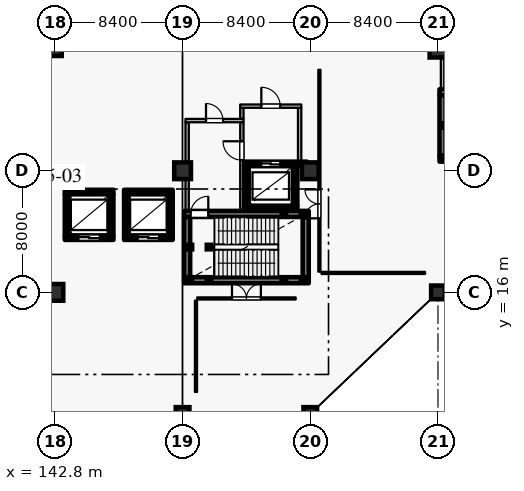
"""IFC4 building model, lengths in metres.
Left out: names, types, materials, properties, quantities, classifications, styles, units other than length and angle.
Written with IfcOpenShell. Run it as: python <this file> out.ifc"""

import sys

from ifc_helpers import new_model, si_unit, direction, frame, frame_2d, origin, origin_2d, place, context, subcontext, project, spatial, rectangle, hollow_rectangle, circle, extrude, element, fill, save


model = new_model("IFC4")
c1 = context("Model", 3, precision=1e-05, world=origin(), true_north=direction((0.0, 1.0)))
c2 = subcontext(c1, "Body", "Model", "MODEL_VIEW")
j1 = project(units=[si_unit("LENGTHUNIT", "METRE"), si_unit("PLANEANGLEUNIT", "RADIAN")], contexts=[c1])
p1 = place(None, origin())
s1 = spatial("IfcSite", under=j1, at=p1, CompositionType="ELEMENT")
p2 = place(p1, origin())
s2 = spatial("IfcBuilding", under=s1, at=p2, CompositionType="ELEMENT")
p3 = place(p2, frame((0.0, 0.0, 6.0)))
s3 = spatial("IfcBuildingStorey", under=s2, at=p3, CompositionType="ELEMENT", Elevation=6.0)
p4 = place(p3, frame((142.8, 16.0, 0.0), z_axis=(0.0, 0.0, 1.0), x_axis=(1.0, 0.0, 0.0)))
e1 = element("IfcColumn", 1, at=p4, inside=s3, PredefinedType="COLUMN", context=c2, shape_type="SweptSolid", body=[
    extrude(circle(Radius=0.55, at=origin_2d()), origin(), (0.0, 0.0, 1.0), 5.4),
])
for number, where, z_axis, x_axis in (
    (2, (142.8, 32.0, 0.0), (0.0, 0.0, 1.0), (1.0, 0.0, 0.0)),
    (3, (151.2, 8.0, 0.0), (0.0, 0.0, 1.0), (1.0, 0.0, 0.0)),
):
    element("IfcColumn", number, at=place(p3, frame(where, z_axis=z_axis, x_axis=x_axis)), inside=s3, PredefinedType="COLUMN", context=c2, shape_type="SweptSolid", body=[
        extrude(circle(Radius=0.45, at=origin_2d()), origin(), (0.0, 0.0, 1.0), 5.4),
    ])
p5 = place(p3, frame((151.2, 24.0, 0.0), z_axis=(0.0, 0.0, 1.0), x_axis=(1.0, 0.0, 0.0)))
e4 = element("IfcColumn", 4, at=p5, inside=s3, PredefinedType="COLUMN", context=c2, shape_type="SweptSolid", body=[
    extrude(circle(Radius=0.55, at=origin_2d()), origin(), (0.0, 0.0, 1.0), 5.4),
])
p6 = place(p3, frame((159.6, 8.0, 0.0), z_axis=(0.0, 0.0, 1.0), x_axis=(1.0, 0.0, 0.0)))
e5 = element("IfcColumn", 5, at=p6, inside=s3, PredefinedType="COLUMN", context=c2, shape_type="SweptSolid", body=[
    extrude(circle(Radius=0.45, at=origin_2d()), origin(), (0.0, 0.0, 1.0), 5.4),
])
p7 = place(p3, frame((159.6, 24.0, 0.0), z_axis=(0.0, 0.0, 1.0), x_axis=(1.0, 0.0, 0.0)))
e6 = element("IfcColumn", 6, at=p7, inside=s3, PredefinedType="COLUMN", context=c2, shape_type="SweptSolid", body=[
    extrude(circle(Radius=0.55, at=origin_2d()), origin(), (0.0, 0.0, 1.0), 5.4),
])
p8 = place(p3, frame((168.0, 16.0, 0.0), z_axis=(0.0, 0.0, 1.0), x_axis=(1.0, 0.0, 0.0)))
e7 = element("IfcColumn", 7, at=p8, inside=s3, PredefinedType="COLUMN", context=c2, shape_type="SweptSolid", body=[
    extrude(circle(Radius=0.45, at=origin_2d()), origin(), (0.0, 0.0, 1.0), 5.4),
])
p9 = place(p3, frame((168.0, 32.0, 0.0), z_axis=(0.0, 0.0, 1.0), x_axis=(1.0, 0.0, 0.0)))
e8 = element("IfcColumn", 8, at=p9, inside=s3, PredefinedType="COLUMN", context=c2, shape_type="SweptSolid", body=[
    extrude(circle(Radius=0.55, at=origin_2d()), origin(), (0.0, 0.0, 1.0), 5.4),
])
p10 = place(p3, frame((155.25, 21.55, 0.0), z_axis=(0.0, 0.0, 1.0), x_axis=(1.0, 0.0, 0.0)))
e9 = element("IfcWall", 9, at=p10, inside=s3, PredefinedType="SHEAR", context=c2, shape_type="SweptSolid", body=[
    extrude(rectangle(XDim=3.5, YDim=0.3, at=frame_2d((1.75, 0.0))), origin(), (0.0, 0.0, 1.0), 5.045),
])
p11 = place(p3, frame((158.6, 21.705, 0.0), z_axis=(0.0, 0.0, 1.0), x_axis=(0.0, 1.0, 0.0)))
e10 = element("IfcWall", 10, at=p11, inside=s3, PredefinedType="SHEAR", context=c2, shape_type="SweptSolid", body=[
    extrude(rectangle(XDim=2.59, YDim=0.3, at=frame_2d((1.295, 0.0))), origin(), (0.0, 0.0, 1.0), 5.045),
])
p12 = place(p3, frame((159.38, 24.45, 0.0), z_axis=(0.0, 0.0, 1.0), x_axis=(-1.0, 0.0, 0.0)))
e11 = element("IfcWall", 11, at=p12, inside=s3, PredefinedType="SHEAR", context=c2, shape_type="SweptSolid", body=[
    extrude(rectangle(XDim=4.13, YDim=0.3, at=frame_2d((2.065, 0.0))), origin(), (0.0, 0.0, 1.0), 5.045),
])
p13 = place(p12, frame((1.755, 0.0, 0.0)))
e12 = element("IfcOpeningElement", 12, at=p13, cuts=e11, PredefinedType="OPENING", context=c2, shape_type="SweptSolid", body=[
    extrude(rectangle(XDim=1.25, YDim=2.25, at=frame_2d((0.625, 1.125))), frame((0.0, 0.16, 0.0), z_axis=(0.0, -1.0, 0.0), x_axis=(1.0, 0.0, 0.0)), (0.0, 0.0, 1.0), 0.32),
])
p14 = place(p3, frame((155.4, 24.295, 0.0), z_axis=(0.0, 0.0, 1.0), x_axis=(0.0, -1.0, 0.0)))
e13 = element("IfcWall", 13, at=p14, inside=s3, PredefinedType="SHEAR", context=c2, shape_type="SweptSolid", body=[
    extrude(rectangle(XDim=2.59, YDim=0.3, at=frame_2d((1.295, 0.0))), origin(), (0.0, 0.0, 1.0), 5.045),
])
p15 = place(p3, frame((143.45, 19.6, 0.0), z_axis=(0.0, 0.0, 1.0), x_axis=(1.0, 0.0, 0.0)))
e14 = element("IfcWall", 14, at=p15, inside=s3, PredefinedType="SHEAR", context=c2, shape_type="SweptSolid", body=[
    extrude(rectangle(XDim=3.2, YDim=0.3, at=frame_2d((1.6, 0.0))), origin(), (0.0, 0.0, 1.0), 5.045),
])
p16 = place(p15, frame((0.9, 0.0, 0.0)))
e15 = element("IfcOpeningElement", 15, at=p16, cuts=e14, PredefinedType="OPENING", context=c2, shape_type="SweptSolid", body=[
    extrude(rectangle(XDim=1.4, YDim=2.35, at=frame_2d((0.7, 1.175))), frame((0.0, 0.16, 0.0), z_axis=(0.0, -1.0, 0.0), x_axis=(1.0, 0.0, 0.0)), (0.0, 0.0, 1.0), 0.32),
])
p17 = place(p3, frame((146.5, 19.755, 0.0), z_axis=(0.0, 0.0, 1.0), x_axis=(0.0, 1.0, 0.0)))
e16 = element("IfcWall", 16, at=p17, inside=s3, PredefinedType="SHEAR", context=c2, shape_type="SweptSolid", body=[
    extrude(rectangle(XDim=2.69, YDim=0.3, at=frame_2d((1.345, 0.0))), origin(), (0.0, 0.0, 1.0), 5.045),
])
p18 = place(p3, frame((146.65, 22.6, 0.0), z_axis=(0.0, 0.0, 1.0), x_axis=(-1.0, 0.0, 0.0)))
e17 = element("IfcWall", 17, at=p18, inside=s3, PredefinedType="SHEAR", context=c2, shape_type="SweptSolid", body=[
    extrude(rectangle(XDim=3.2, YDim=0.3, at=frame_2d((1.6, 0.0))), origin(), (0.0, 0.0, 1.0), 5.045),
])
p19 = place(p3, frame((143.6, 22.445, 0.0), z_axis=(0.0, 0.0, 1.0), x_axis=(0.0, -1.0, 0.0)))
e18 = element("IfcWall", 18, at=p19, inside=s3, PredefinedType="SHEAR", context=c2, shape_type="SweptSolid", body=[
    extrude(rectangle(XDim=2.69, YDim=0.3, at=frame_2d((1.345, 0.0))), origin(), (0.0, 0.0, 1.0), 5.045),
])
p20 = place(p3, frame((147.35, 19.6, 0.0), z_axis=(0.0, 0.0, 1.0), x_axis=(1.0, 0.0, 0.0)))
e19 = element("IfcWall", 19, at=p20, inside=s3, PredefinedType="SHEAR", context=c2, shape_type="SweptSolid", body=[
    extrude(rectangle(XDim=3.2, YDim=0.3, at=frame_2d((1.6, 0.0))), origin(), (0.0, 0.0, 1.0), 5.045),
])
p21 = place(p20, frame((0.9, 0.0, 0.0)))
e20 = element("IfcOpeningElement", 20, at=p21, cuts=e19, PredefinedType="OPENING", context=c2, shape_type="SweptSolid", body=[
    extrude(rectangle(XDim=1.4, YDim=2.35, at=frame_2d((0.7, 1.175))), frame((0.0, 0.16, 0.0), z_axis=(0.0, -1.0, 0.0), x_axis=(1.0, 0.0, 0.0)), (0.0, 0.0, 1.0), 0.32),
])
p22 = place(p3, frame((150.4, 19.755, 0.0), z_axis=(0.0, 0.0, 1.0), x_axis=(0.0, 1.0, 0.0)))
e21 = element("IfcWall", 21, at=p22, inside=s3, PredefinedType="SHEAR", context=c2, shape_type="SweptSolid", body=[
    extrude(rectangle(XDim=2.69, YDim=0.3, at=frame_2d((1.345, 0.0))), origin(), (0.0, 0.0, 1.0), 5.045),
])
p23 = place(p3, frame((150.55, 22.6, 0.0), z_axis=(0.0, 0.0, 1.0), x_axis=(-1.0, 0.0, 0.0)))
e22 = element("IfcWall", 22, at=p23, inside=s3, PredefinedType="SHEAR", context=c2, shape_type="SweptSolid", body=[
    extrude(rectangle(XDim=3.2, YDim=0.3, at=frame_2d((1.6, 0.0))), origin(), (0.0, 0.0, 1.0), 5.045),
])
p24 = place(p3, frame((147.5, 22.445, 0.0), z_axis=(0.0, 0.0, 1.0), x_axis=(0.0, -1.0, 0.0)))
e23 = element("IfcWall", 23, at=p24, inside=s3, PredefinedType="SHEAR", context=c2, shape_type="SweptSolid", body=[
    extrude(rectangle(XDim=2.69, YDim=0.3, at=frame_2d((1.345, 0.0))), origin(), (0.0, 0.0, 1.0), 5.045),
])
p25 = place(p3, frame((151.3, 16.8, 0.0), z_axis=(0.0, 0.0, 1.0), x_axis=(1.0, 0.0, 0.0)))
e24 = element("IfcWall", 24, at=p25, inside=s3, PredefinedType="SHEAR", context=c2, shape_type="SweptSolid", body=[
    extrude(rectangle(XDim=8.2, YDim=0.4, at=frame_2d((4.1, 0.0))), origin(), (0.0, 0.0, 1.0), 5.045),
])
p26 = place(p3, frame((159.3, 17.005, 0.0), z_axis=(0.0, 0.0, 1.0), x_axis=(0.0, 1.0, 0.0)))
e25 = element("IfcWall", 25, at=p26, inside=s3, PredefinedType="SHEAR", context=c2, shape_type="SweptSolid", body=[
    extrude(rectangle(XDim=3.95, YDim=0.4, at=frame_2d((1.975, 0.0))), origin(), (0.0, 0.0, 1.0), 5.045),
])
p27 = place(p3, frame((151.3, 21.16, 0.0), z_axis=(0.0, 0.0, 1.0), x_axis=(1.0, 0.0, 0.0)))
e26 = element("IfcWall", 26, at=p27, inside=s3, PredefinedType="SHEAR", context=c2, shape_type="SweptSolid", body=[
    extrude(rectangle(XDim=8.2, YDim=0.4, at=frame_2d((4.1, 0.0))), origin(), (0.0, 0.0, 1.0), 5.045),
])
p28 = place(p27, frame((0.43, 0.0, 0.0)))
e27 = element("IfcOpeningElement", 27, at=p28, cuts=e26, PredefinedType="OPENING", context=c2, shape_type="SweptSolid", body=[
    extrude(rectangle(XDim=1.16, YDim=2.2, at=frame_2d((0.58, 1.1))), frame((0.0, 0.21, 0.0), z_axis=(0.0, -1.0, 0.0), x_axis=(1.0, 0.0, 0.0)), (0.0, 0.0, 1.0), 0.42),
])
p29 = place(p3, frame((151.5, 17.005, 0.0), z_axis=(0.0, 0.0, 1.0), x_axis=(0.0, 1.0, 0.0)))
e28 = element("IfcWall", 28, at=p29, inside=s3, PredefinedType="SHEAR", context=c2, shape_type="SweptSolid", body=[
    extrude(rectangle(XDim=3.95, YDim=0.4, at=frame_2d((1.975, 0.0))), origin(), (0.0, 0.0, 1.0), 5.045),
])
p30 = place(p3, frame((151.5, 21.365, 0.0), z_axis=(0.0, 0.0, 1.0), x_axis=(0.0, 1.0, 0.0)))
e29 = element("IfcWall", 29, at=p30, inside=s3, PredefinedType="PARTITIONING", context=c2, shape_type="SweptSolid", body=[
    extrude(rectangle(XDim=5.82, YDim=0.22, at=frame_2d((2.91, 0.0))), origin(), (0.0, 0.0, 1.0), 3.45),
])
p31 = place(p3, frame((151.39, 27.3, 0.0), z_axis=(0.0, 0.0, 1.0), x_axis=(1.0, 0.0, 0.0)))
e30 = element("IfcWall", 30, at=p31, inside=s3, PredefinedType="PARTITIONING", context=c2, shape_type="SweptSolid", body=[
    extrude(rectangle(XDim=3.82, YDim=0.22, at=frame_2d((1.91, 0.0))), origin(), (0.0, 0.0, 1.0), 5.045),
])
p32 = place(p31, frame((1.35, 0.0, 0.0)))
e31 = element("IfcOpeningElement", 31, at=p32, cuts=e30, PredefinedType="OPENING", context=c2, shape_type="SweptSolid", body=[
    extrude(rectangle(XDim=1.12, YDim=2.2, at=frame_2d((0.56, 1.1))), frame((0.0, 0.12, 0.0), z_axis=(0.0, -1.0, 0.0), x_axis=(1.0, 0.0, 0.0)), (0.0, 0.0, 1.0), 0.24),
])
p33 = place(p3, frame((155.1, 21.365, 0.0), z_axis=(0.0, 0.0, 1.0), x_axis=(0.0, 1.0, 0.0)))
e32 = element("IfcWall", 32, at=p33, inside=s3, PredefinedType="PARTITIONING", context=c2, shape_type="SweptSolid", body=[
    extrude(rectangle(XDim=5.82, YDim=0.22, at=frame_2d((2.91, 0.0))), origin(), (0.0, 0.0, 1.0), 5.045),
])
p34 = place(p33, frame((3.335, 0.0, 0.0)))
e33 = element("IfcOpeningElement", 33, at=p34, cuts=e32, PredefinedType="OPENING", context=c2, shape_type="SweptSolid", body=[
    extrude(rectangle(XDim=1.24, YDim=2.2, at=frame_2d((0.62, 1.1))), frame((0.0, 0.12, 0.0), z_axis=(0.0, -1.0, 0.0), x_axis=(1.0, 0.0, 0.0)), (0.0, 0.0, 1.0), 0.24),
])
p35 = place(p3, frame((155.1, 27.415, 0.0), z_axis=(0.0, 0.0, 1.0), x_axis=(0.0, 1.0, 0.0)))
e34 = element("IfcWall", 34, at=p35, inside=s3, PredefinedType="PARTITIONING", context=c2, shape_type="SweptSolid", body=[
    extrude(rectangle(XDim=0.72, YDim=0.22, at=frame_2d((0.36, 0.0))), origin(), (0.0, 0.0, 1.0), 5.045),
])
p36 = place(p3, frame((158.9, 24.605, 0.0), z_axis=(0.0, 0.0, 1.0), x_axis=(0.0, 1.0, 0.0)))
e35 = element("IfcWall", 35, at=p36, inside=s3, PredefinedType="PARTITIONING", context=c2, shape_type="SweptSolid", body=[
    extrude(rectangle(XDim=3.53, YDim=0.22, at=frame_2d((1.765, 0.0))), origin(), (0.0, 0.0, 1.0), 5.045),
])
p37 = place(p3, frame((154.99, 28.25, 0.0), z_axis=(0.0, 0.0, 1.0), x_axis=(1.0, 0.0, 0.0)))
e36 = element("IfcWall", 36, at=p37, inside=s3, PredefinedType="PARTITIONING", context=c2, shape_type="SweptSolid", body=[
    extrude(rectangle(XDim=4.02, YDim=0.22, at=frame_2d((2.01, 0.0))), origin(), (0.0, 0.0, 1.0), 5.045),
])
p38 = place(p37, frame((1.39, 0.0, 0.0)))
e37 = element("IfcOpeningElement", 37, at=p38, cuts=e36, PredefinedType="OPENING", context=c2, shape_type="SweptSolid", body=[
    extrude(rectangle(XDim=1.24, YDim=2.2, at=frame_2d((0.62, 1.1))), frame((0.0, 0.12, 0.0), z_axis=(0.0, -1.0, 0.0), x_axis=(1.0, 0.0, 0.0)), (0.0, 0.0, 1.0), 0.24),
])
for number, where, z_axis, x_axis in (
    (38, (151.68, 16.8, 0.0), (0.0, 0.0, 1.0), (1.0, 0.0, 0.0)),
    (39, (151.68, 18.98, 0.0), (0.0, 0.0, 1.0), (1.0, 0.0, 0.0)),
    (40, (152.94, 16.8, 0.0), (0.0, 0.0, 1.0), (1.0, 0.0, 0.0)),
    (41, (152.94, 18.98, 0.0), (0.0, 0.0, 1.0), (1.0, 0.0, 0.0)),
):
    element("IfcColumn", number, at=place(p3, frame(where, z_axis=z_axis, x_axis=x_axis)), inside=s3, PredefinedType="COLUMN", context=c2, shape_type="SweptSolid", body=[
        extrude(hollow_rectangle(XDim=0.3, YDim=0.3, WallThickness=0.012, at=origin_2d()), origin(), (0.0, 0.0, 1.0), 5.22),
    ])
for number, where, z_axis, x_axis in (
    (42, (157.86, 16.8, -3.0), (0.0, 0.0, 1.0), (1.0, 0.0, 0.0)),
    (43, (157.86, 21.16, -3.0), (0.0, 0.0, 1.0), (1.0, 0.0, 0.0)),
    (44, (159.12, 16.8, -3.0), (0.0, 0.0, 1.0), (1.0, 0.0, 0.0)),
    (45, (159.12, 21.16, -3.0), (0.0, 0.0, 1.0), (1.0, 0.0, 0.0)),
):
    element("IfcColumn", number, at=place(p3, frame(where, z_axis=z_axis, x_axis=x_axis)), inside=s3, PredefinedType="COLUMN", context=c2, shape_type="SweptSolid", body=[
        extrude(hollow_rectangle(XDim=0.3, YDim=0.3, WallThickness=0.012, at=origin_2d()), origin(), (0.0, 0.0, 1.0), 5.52),
    ])
p39 = place(p3, frame((168.1, 24.8, 0.0), z_axis=(0.0, 0.0, 1.0), x_axis=(1.0, 0.0, 0.0)))
e46 = element("IfcWall", 46, at=p39, inside=s3, PredefinedType="SHEAR", context=c2, shape_type="SweptSolid", body=[
    extrude(rectangle(XDim=8.2, YDim=0.4, at=frame_2d((4.1, 0.0))), origin(), (0.0, 0.0, 1.0), 5.045),
])
p40 = place(p3, frame((168.1, 29.16, 0.0), z_axis=(0.0, 0.0, 1.0), x_axis=(1.0, 0.0, 0.0)))
e47 = element("IfcWall", 47, at=p40, inside=s3, PredefinedType="SHEAR", context=c2, shape_type="SweptSolid", body=[
    extrude(rectangle(XDim=8.2, YDim=0.4, at=frame_2d((4.1, 0.0))), origin(), (0.0, 0.0, 1.0), 5.045),
])
p41 = place(p40, frame((0.43, 0.0, 0.0)))
e48 = element("IfcOpeningElement", 48, at=p41, cuts=e47, PredefinedType="OPENING", context=c2, shape_type="SweptSolid", body=[
    extrude(rectangle(XDim=1.16, YDim=2.2, at=frame_2d((0.58, 1.1))), frame((0.0, 0.21, 0.0), z_axis=(0.0, -1.0, 0.0), x_axis=(1.0, 0.0, 0.0)), (0.0, 0.0, 1.0), 0.42),
])
p42 = place(p3, frame((168.3, 25.005, 0.0), z_axis=(0.0, 0.0, 1.0), x_axis=(0.0, 1.0, 0.0)))
e49 = element("IfcWall", 49, at=p42, inside=s3, PredefinedType="SHEAR", context=c2, shape_type="SweptSolid", body=[
    extrude(rectangle(XDim=3.95, YDim=0.4, at=frame_2d((1.975, 0.0))), origin(), (0.0, 0.0, 1.0), 5.045),
])
p43 = place(p3, frame((168.3, 29.365, 0.0), z_axis=(0.0, 0.0, 1.0), x_axis=(0.0, 1.0, 0.0)))
e50 = element("IfcWall", 50, at=p43, inside=s3, PredefinedType="PARTITIONING", context=c2, shape_type="SweptSolid", body=[
    extrude(rectangle(XDim=2.92, YDim=0.22, at=frame_2d((1.46, 0.0))), origin(), (0.0, 0.0, 1.0), 3.45),
])
for number, where, z_axis, x_axis in (
    (51, (168.48, 24.8, 0.0), (0.0, 0.0, 1.0), (1.0, 0.0, 0.0)),
    (52, (168.48, 26.98, 0.0), (0.0, 0.0, 1.0), (1.0, 0.0, 0.0)),
):
    element("IfcColumn", number, at=place(p3, frame(where, z_axis=z_axis, x_axis=x_axis)), inside=s3, PredefinedType="COLUMN", context=c2, shape_type="SweptSolid", body=[
        extrude(hollow_rectangle(XDim=0.3, YDim=0.3, WallThickness=0.012, at=origin_2d()), origin(), (0.0, 0.0, 1.0), 5.22),
    ])
p44 = place(p3, frame((152.16, 15.6, 0.0), z_axis=(0.0, 0.0, 1.0), x_axis=(1.0, 0.0, 0.0)))
e53 = element("IfcWall", 53, at=p44, inside=s3, PredefinedType="PARTITIONING", context=c2, shape_type="SweptSolid", body=[
    extrude(rectangle(XDim=6.48, YDim=0.14, at=frame_2d((3.24, 0.0))), origin(), (0.0, 0.0, 1.0), 5.045),
])
p45 = place(p44, frame((2.29, 0.0, 0.0)))
e54 = element("IfcOpeningElement", 54, at=p45, cuts=e53, PredefinedType="OPENING", context=c2, shape_type="SweptSolid", body=[
    extrude(rectangle(XDim=1.9, YDim=2.4, at=frame_2d((0.95, 1.2))), frame((0.0, 0.08, 0.0), z_axis=(0.0, -1.0, 0.0), x_axis=(1.0, 0.0, 0.0)), (0.0, 0.0, 1.0), 0.16),
])
p46 = place(p3, frame((152.08, 9.45, 0.0), z_axis=(0.0, 0.0, 1.0), x_axis=(0.0, 1.0, 0.0)))
e55 = element("IfcWall", 55, at=p46, inside=s3, PredefinedType="PARTITIONING", context=c2, shape_type="SweptSolid", body=[
    extrude(rectangle(XDim=6.01, YDim=0.14, at=frame_2d((3.005, 0.0))), origin(), (0.0, 0.0, 1.0), 5.045),
])
p47 = place(p3, frame((160.2, 17.36, 0.0), z_axis=(0.0, 0.0, 1.0), x_axis=(0.0, 1.0, 0.0)))
e56 = element("IfcWall", 56, at=p47, inside=s3, PredefinedType="PARTITIONING", context=c2, shape_type="SweptSolid", body=[
    extrude(rectangle(XDim=13.28, YDim=0.14, at=frame_2d((6.64, 0.0))), origin(), (0.0, 0.0, 1.0), 5.045),
])
p48 = place(p47, frame((3.51, 0.0, 0.0)))
e57 = element("IfcOpeningElement", 57, at=p48, cuts=e56, PredefinedType="OPENING", context=c2, shape_type="SweptSolid", body=[
    extrude(rectangle(XDim=1.9, YDim=2.4, at=frame_2d((0.95, 1.2))), frame((0.0, 0.08, 0.0), z_axis=(0.0, -1.0, 0.0), x_axis=(1.0, 0.0, 0.0)), (0.0, 0.0, 1.0), 0.16),
])
p49 = place(p3, frame((160.34, 17.28, 0.0), z_axis=(0.0, 0.0, 1.0), x_axis=(1.0, 0.0, 0.0)))
e58 = element("IfcWall", 58, at=p49, inside=s3, PredefinedType="PARTITIONING", context=c2, shape_type="SweptSolid", body=[
    extrude(rectangle(XDim=6.81, YDim=0.14, at=frame_2d((3.405, 0.0))), origin(), (0.0, 0.0, 1.0), 5.045),
])
p50 = place(p13, origin())
e59 = element("IfcDoor", 59, at=p50, inside=s3, OperationType="DOUBLE_DOOR_SLIDING", PredefinedType="DOOR", context=c2, shape_type="SweptSolid", body=[
    extrude(rectangle(XDim=1.25, YDim=2.25, at=frame_2d((0.625, 1.125))), frame((0.0, 0.025, 0.0), z_axis=(0.0, -1.0, 0.0), x_axis=(1.0, 0.0, 0.0)), (0.0, 0.0, 1.0), 0.05),
])
fill(e12, e59)
p51 = place(p16, origin())
e60 = element("IfcDoor", 60, at=p51, inside=s3, OperationType="DOUBLE_DOOR_SLIDING", PredefinedType="DOOR", context=c2, shape_type="SweptSolid", body=[
    extrude(rectangle(XDim=1.4, YDim=2.35, at=frame_2d((0.7, 1.175))), frame((0.0, 0.025, 0.0), z_axis=(0.0, -1.0, 0.0), x_axis=(1.0, 0.0, 0.0)), (0.0, 0.0, 1.0), 0.05),
])
fill(e15, e60)
p52 = place(p21, origin())
e61 = element("IfcDoor", 61, at=p52, inside=s3, OperationType="DOUBLE_DOOR_SLIDING", PredefinedType="DOOR", context=c2, shape_type="SweptSolid", body=[
    extrude(rectangle(XDim=1.4, YDim=2.35, at=frame_2d((0.7, 1.175))), frame((0.0, 0.025, 0.0), z_axis=(0.0, -1.0, 0.0), x_axis=(1.0, 0.0, 0.0)), (0.0, 0.0, 1.0), 0.05),
])
fill(e20, e61)
p53 = place(p28, origin())
e62 = element("IfcDoor", 62, at=p53, inside=s3, OperationType="SINGLE_SWING_RIGHT", PredefinedType="DOOR", context=c2, shape_type="SweptSolid", body=[
    extrude(rectangle(XDim=1.16, YDim=2.2, at=frame_2d((0.58, 1.1))), frame((0.0, 0.025, 0.0), z_axis=(0.0, -1.0, 0.0), x_axis=(1.0, 0.0, 0.0)), (0.0, 0.0, 1.0), 0.05),
])
fill(e27, e62)
p54 = place(p32, origin())
e63 = element("IfcDoor", 63, at=p54, inside=s3, OperationType="SINGLE_SWING_LEFT", PredefinedType="DOOR", context=c2, shape_type="SweptSolid", body=[
    extrude(rectangle(XDim=1.12, YDim=2.2, at=frame_2d((0.56, 1.1))), frame((0.0, 0.025, 0.0), z_axis=(0.0, -1.0, 0.0), x_axis=(1.0, 0.0, 0.0)), (0.0, 0.0, 1.0), 0.05),
])
fill(e31, e63)
p55 = place(p34, origin())
e64 = element("IfcDoor", 64, at=p55, inside=s3, OperationType="SINGLE_SWING_RIGHT", PredefinedType="DOOR", context=c2, shape_type="SweptSolid", body=[
    extrude(rectangle(XDim=1.24, YDim=2.2, at=frame_2d((0.62, 1.1))), frame((0.0, 0.025, 0.0), z_axis=(0.0, -1.0, 0.0), x_axis=(1.0, 0.0, 0.0)), (0.0, 0.0, 1.0), 0.05),
])
fill(e33, e64)
p56 = place(p38, origin())
e65 = element("IfcDoor", 65, at=p56, inside=s3, OperationType="SINGLE_SWING_LEFT", PredefinedType="DOOR", context=c2, shape_type="SweptSolid", body=[
    extrude(rectangle(XDim=1.24, YDim=2.2, at=frame_2d((0.62, 1.1))), frame((0.0, 0.025, 0.0), z_axis=(0.0, -1.0, 0.0), x_axis=(1.0, 0.0, 0.0)), (0.0, 0.0, 1.0), 0.05),
])
fill(e37, e65)
p57 = place(p45, origin())
e66 = element("IfcDoor", 66, at=p57, inside=s3, OperationType="DOUBLE_DOOR_SINGLE_SWING", PredefinedType="DOOR", context=c2, shape_type="SweptSolid", body=[
    extrude(rectangle(XDim=1.9, YDim=2.4, at=frame_2d((0.95, 1.2))), frame((0.0, 0.025, 0.0), z_axis=(0.0, -1.0, 0.0), x_axis=(1.0, 0.0, 0.0)), (0.0, 0.0, 1.0), 0.05),
])
fill(e54, e66)
p58 = place(p48, origin())
e67 = element("IfcDoor", 67, at=p58, inside=s3, OperationType="DOUBLE_DOOR_SINGLE_SWING", PredefinedType="DOOR", context=c2, shape_type="SweptSolid", body=[
    extrude(rectangle(XDim=1.9, YDim=2.4, at=frame_2d((0.95, 1.2))), frame((0.0, 0.025, 0.0), z_axis=(0.0, -1.0, 0.0), x_axis=(1.0, 0.0, 0.0)), (0.0, 0.0, 1.0), 0.05),
])
fill(e57, e67)
save(model, sys.argv[1])
